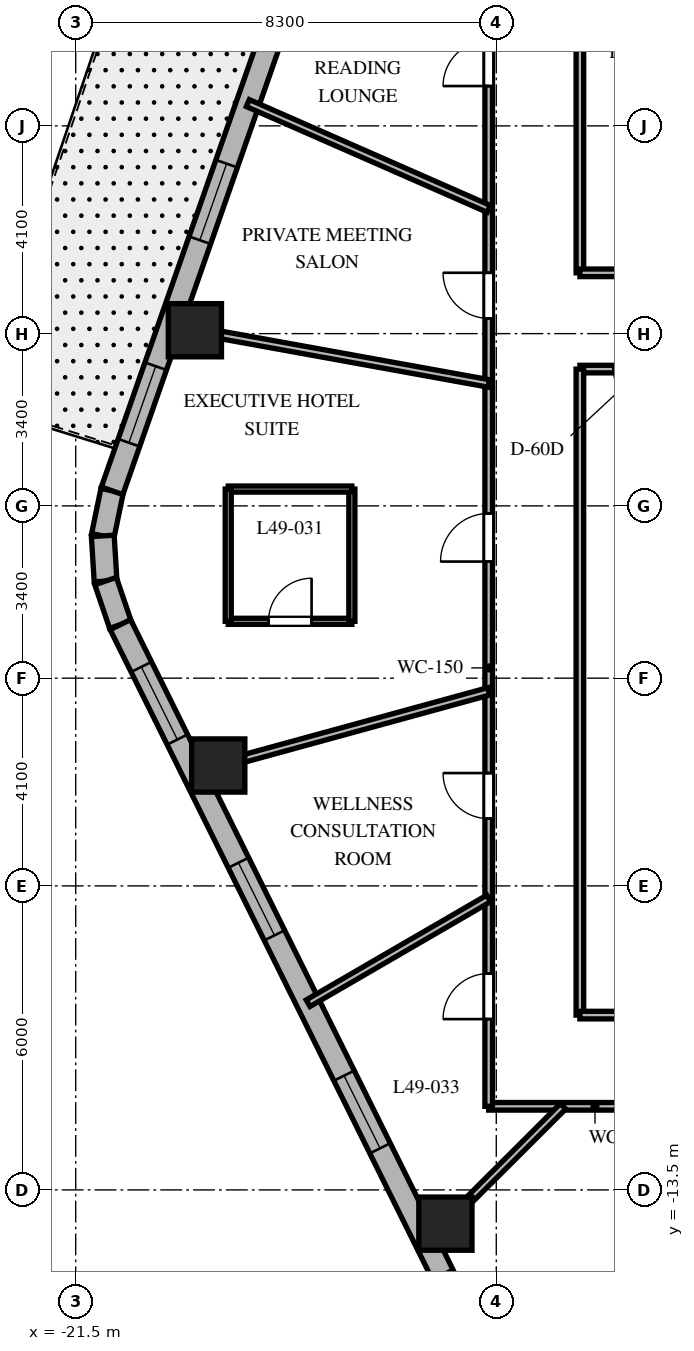
"""IFC4 building model, lengths in metres.
Left out: names, types, materials, properties, quantities, classifications, styles, units other than length and angle.
Written with IfcOpenShell. Run it as: python <this file> out.ifc"""

import sys

from ifc_helpers import new_model, si_unit, direction, frame, frame_2d, origin, origin_2d, place, context, subcontext, project, spatial, rectangle, extrude, element, fill, save


model = new_model("IFC4")
c1 = context("Model", 3, precision=1e-05, world=origin(), true_north=direction((0.0, 1.0)))
c2 = subcontext(c1, "Body", "Model", "MODEL_VIEW")
j1 = project(units=[si_unit("LENGTHUNIT", "METRE"), si_unit("PLANEANGLEUNIT", "RADIAN")], contexts=[c1])
p1 = place(None, origin())
s1 = spatial("IfcSite", under=j1, at=p1, CompositionType="ELEMENT")
p2 = place(p1, origin())
s2 = spatial("IfcBuilding", under=s1, at=p2, CompositionType="ELEMENT")
p3 = place(p2, frame((0.0, 0.0, 197.8)))
s3 = spatial("IfcBuildingStorey", under=s2, at=p3, CompositionType="ELEMENT", Elevation=197.8)
for number, where, z_axis, x_axis in (
    (1, (-19.148, 3.467, 0.0), (0.0, 0.0, 1.0), (1.0, 0.0, 0.0)),
    (2, (-18.687, -5.124, 0.0), (0.0, 0.0, 1.0), (1.0, 0.0, 0.0)),
    (3, (-14.204, -14.166, 0.0), (0.0, 0.0, 1.0), (1.0, 0.0, 0.0)),
):
    element("IfcColumn", number, at=place(p3, frame(where, z_axis=z_axis, x_axis=x_axis)), inside=s3, PredefinedType="COLUMN", context=c2, shape_type="SweptSolid", body=[
        extrude(rectangle(XDim=1.05, YDim=1.05, at=origin_2d()), origin(), (0.0, 0.0, 1.0), 3.7),
    ])
p4 = place(p3, frame((-20.782, 0.298, 0.0), z_axis=(0.0, 0.0, 1.0), x_axis=(-0.202570068411, -0.979267771033, 0.0)))
e4 = element("IfcWall", 4, at=p4, inside=s3, PredefinedType="SOLIDWALL", context=c2, shape_type="SweptSolid", body=[
    extrude(rectangle(XDim=0.909, YDim=0.45, at=frame_2d((0.454, 0.0))), origin(), (0.0, 0.0, 1.0), 3.35),
])
p5 = place(p3, frame((-20.966, -0.592, 0.0), z_axis=(0.0, 0.0, 1.0), x_axis=(0.061748898935, -0.998091715966, 0.0)))
e5 = element("IfcWall", 5, at=p5, inside=s3, PredefinedType="SOLIDWALL", context=c2, shape_type="SweptSolid", body=[
    extrude(rectangle(XDim=0.894, YDim=0.45, at=frame_2d((0.447, 0.0))), origin(), (0.0, 0.0, 1.0), 3.35),
])
p6 = place(p3, frame((-20.911, -1.484, 0.0), z_axis=(0.0, 0.0, 1.0), x_axis=(0.321623334353, -0.946867694453, 0.0)))
e6 = element("IfcWall", 6, at=p6, inside=s3, PredefinedType="SOLIDWALL", context=c2, shape_type="SweptSolid", body=[
    extrude(rectangle(XDim=0.909, YDim=0.45, at=frame_2d((0.454, 0.0))), origin(), (0.0, 0.0, 1.0), 3.35),
])
p7 = place(p3, frame((-14.937, 16.993, 0.0), z_axis=(0.0, 0.0, 1.0), x_axis=(-0.330431575061, -0.943829949834, 0.0)))
e7 = element("IfcWall", 7, at=p7, inside=s3, PredefinedType="SOLIDWALL", context=c2, shape_type="SweptSolid", body=[
    extrude(rectangle(XDim=17.689, YDim=0.45, at=frame_2d((8.844, 0.0))), origin(), (0.0, 0.0, 1.0), 3.35),
])
p8 = place(p7, frame((4.807, 0.0, 0.0)))
e8 = element("IfcOpeningElement", 8, at=p8, cuts=e7, PredefinedType="OPENING", context=c2, shape_type="SweptSolid", body=[
    extrude(rectangle(XDim=1.0, YDim=2.15, at=frame_2d((0.5, 1.075))), frame((0.0, 0.235, 0.0), z_axis=(0.0, -1.0, 0.0), x_axis=(1.0, 0.0, 0.0)), (0.0, 0.0, 1.0), 0.47),
])
p9 = place(p7, frame((0.95, 0.0, 0.8)))
e9 = element("IfcOpeningElement", 9, at=p9, cuts=e7, PredefinedType="OPENING", context=c2, shape_type="SweptSolid", body=[
    extrude(rectangle(XDim=1.6, YDim=1.75, at=frame_2d((0.8, 0.875))), frame((0.0, 0.235, 0.0), z_axis=(0.0, -1.0, 0.0), x_axis=(1.0, 0.0, 0.0)), (0.0, 0.0, 1.0), 0.47),
])
p10 = place(p7, frame((6.623, 0.0, 0.8)))
e10 = element("IfcOpeningElement", 10, at=p10, cuts=e7, PredefinedType="OPENING", context=c2, shape_type="SweptSolid", body=[
    extrude(rectangle(XDim=1.6, YDim=1.75, at=frame_2d((0.8, 0.875))), frame((0.0, 0.235, 0.0), z_axis=(0.0, -1.0, 0.0), x_axis=(1.0, 0.0, 0.0)), (0.0, 0.0, 1.0), 0.47),
])
p11 = place(p7, frame((10.849, 0.0, 0.8)))
e11 = element("IfcOpeningElement", 11, at=p11, cuts=e7, PredefinedType="OPENING", context=c2, shape_type="SweptSolid", body=[
    extrude(rectangle(XDim=1.6, YDim=1.75, at=frame_2d((0.8, 0.875))), frame((0.0, 0.235, 0.0), z_axis=(0.0, -1.0, 0.0), x_axis=(1.0, 0.0, 0.0)), (0.0, 0.0, 1.0), 0.47),
])
p12 = place(p7, frame((15.084, 0.0, 0.8)))
e12 = element("IfcOpeningElement", 12, at=p12, cuts=e7, PredefinedType="OPENING", context=c2, shape_type="SweptSolid", body=[
    extrude(rectangle(XDim=1.6, YDim=1.75, at=frame_2d((0.8, 0.875))), frame((0.0, 0.235, 0.0), z_axis=(0.0, -1.0, 0.0), x_axis=(1.0, 0.0, 0.0)), (0.0, 0.0, 1.0), 0.47),
])
p13 = place(p3, frame((-20.618, -2.344, 0.0), z_axis=(0.0, 0.0, 1.0), x_axis=(0.444243691097, -0.895905990002, 0.0)))
e13 = element("IfcWall", 13, at=p13, inside=s3, PredefinedType="SOLIDWALL", context=c2, shape_type="SweptSolid", body=[
    extrude(rectangle(XDim=16.784, YDim=0.45, at=frame_2d((8.392, 0.0))), origin(), (0.0, 0.0, 1.0), 3.35),
])
p14 = place(p13, frame((0.931, 0.0, 0.8)))
e14 = element("IfcOpeningElement", 14, at=p14, cuts=e13, PredefinedType="OPENING", context=c2, shape_type="SweptSolid", body=[
    extrude(rectangle(XDim=1.6, YDim=1.75, at=frame_2d((0.8, 0.875))), frame((0.0, 0.235, 0.0), z_axis=(0.0, -1.0, 0.0), x_axis=(1.0, 0.0, 0.0)), (0.0, 0.0, 1.0), 0.47),
])
p15 = place(p13, frame((5.245, 0.0, 0.8)))
e15 = element("IfcOpeningElement", 15, at=p15, cuts=e13, PredefinedType="OPENING", context=c2, shape_type="SweptSolid", body=[
    extrude(rectangle(XDim=1.6, YDim=1.75, at=frame_2d((0.8, 0.875))), frame((0.0, 0.235, 0.0), z_axis=(0.0, -1.0, 0.0), x_axis=(1.0, 0.0, 0.0)), (0.0, 0.0, 1.0), 0.47),
])
p16 = place(p13, frame((9.936, 0.0, 0.8)))
e16 = element("IfcOpeningElement", 16, at=p16, cuts=e13, PredefinedType="OPENING", context=c2, shape_type="SweptSolid", body=[
    extrude(rectangle(XDim=1.6, YDim=1.75, at=frame_2d((0.8, 0.875))), frame((0.0, 0.235, 0.0), z_axis=(0.0, -1.0, 0.0), x_axis=(1.0, 0.0, 0.0)), (0.0, 0.0, 1.0), 0.47),
])
p17 = place(p13, frame((14.303, 0.0, 0.8)))
e17 = element("IfcOpeningElement", 17, at=p17, cuts=e13, PredefinedType="OPENING", context=c2, shape_type="SweptSolid", body=[
    extrude(rectangle(XDim=1.6, YDim=1.75, at=frame_2d((0.8, 0.875))), frame((0.0, 0.235, 0.0), z_axis=(0.0, -1.0, 0.0), x_axis=(1.0, 0.0, 0.0)), (0.0, 0.0, 1.0), 0.47),
])
p18 = place(p3, frame((13.35, -11.85, 0.0), z_axis=(0.0, 0.0, 1.0), x_axis=(-1.0, 0.0, 0.0)))
e18 = element("IfcWall", 18, at=p18, inside=s3, PredefinedType="PARTITIONING", context=c2, shape_type="SweptSolid", body=[
    extrude(rectangle(XDim=26.7, YDim=0.15, at=frame_2d((13.35, 0.0))), origin(), (0.0, 0.0, 1.0), 2.14),
])
p19 = place(p18, frame((20.682, 0.0, 0.0)))
e19 = element("IfcOpeningElement", 19, at=p19, cuts=e18, PredefinedType="OPENING", context=c2, shape_type="SweptSolid", body=[
    extrude(rectangle(XDim=0.95, YDim=2.03, at=frame_2d((0.475, 1.015))), frame((0.0, 0.085, 0.0), z_axis=(0.0, -1.0, 0.0), x_axis=(1.0, 0.0, 0.0)), (0.0, 0.0, 1.0), 0.17),
])
p20 = place(p18, frame((14.708, 0.0, 0.0)))
e20 = element("IfcOpeningElement", 20, at=p20, cuts=e18, PredefinedType="OPENING", context=c2, shape_type="SweptSolid", body=[
    extrude(rectangle(XDim=0.95, YDim=2.03, at=frame_2d((0.475, 1.015))), frame((0.0, 0.085, 0.0), z_axis=(0.0, -1.0, 0.0), x_axis=(1.0, 0.0, 0.0)), (0.0, 0.0, 1.0), 0.17),
])
p21 = place(p18, frame((10.553, 0.0, 0.0)))
e21 = element("IfcOpeningElement", 21, at=p21, cuts=e18, PredefinedType="OPENING", context=c2, shape_type="SweptSolid", body=[
    extrude(rectangle(XDim=0.95, YDim=2.03, at=frame_2d((0.475, 1.015))), frame((0.0, 0.085, 0.0), z_axis=(0.0, -1.0, 0.0), x_axis=(1.0, 0.0, 0.0)), (0.0, 0.0, 1.0), 0.17),
])
p22 = place(p18, frame((3.97, 0.0, 0.0)))
e22 = element("IfcOpeningElement", 22, at=p22, cuts=e18, PredefinedType="OPENING", context=c2, shape_type="SweptSolid", body=[
    extrude(rectangle(XDim=1.0, YDim=2.03, at=frame_2d((0.5, 1.015))), frame((0.0, 0.085, 0.0), z_axis=(0.0, -1.0, 0.0), x_axis=(1.0, 0.0, 0.0)), (0.0, 0.0, 1.0), 0.17),
])
p23 = place(p3, frame((-13.35, -11.85, 0.0), z_axis=(0.0, 0.0, 1.0), x_axis=(0.0, 1.0, 0.0)))
e23 = element("IfcWall", 23, at=p23, inside=s3, PredefinedType="PARTITIONING", context=c2, shape_type="SweptSolid", body=[
    extrude(rectangle(XDim=23.7, YDim=0.15, at=frame_2d((11.85, 0.0))), origin(), (0.0, 0.0, 1.0), 2.79),
])
p24 = place(p23, frame((20.136, 0.0, 0.0)))
e24 = element("IfcOpeningElement", 24, at=p24, cuts=e23, PredefinedType="OPENING", context=c2, shape_type="SweptSolid", body=[
    extrude(rectangle(XDim=0.9, YDim=2.03, at=frame_2d((0.45, 1.015))), frame((0.0, 0.085, 0.0), z_axis=(0.0, -1.0, 0.0), x_axis=(1.0, 0.0, 0.0)), (0.0, 0.0, 1.0), 0.17),
])
p25 = place(p23, frame((15.551, 0.0, 0.0)))
e25 = element("IfcOpeningElement", 25, at=p25, cuts=e23, PredefinedType="OPENING", context=c2, shape_type="SweptSolid", body=[
    extrude(rectangle(XDim=0.9, YDim=2.03, at=frame_2d((0.45, 1.015))), frame((0.0, 0.085, 0.0), z_axis=(0.0, -1.0, 0.0), x_axis=(1.0, 0.0, 0.0)), (0.0, 0.0, 1.0), 0.17),
])
p26 = place(p23, frame((10.751, 0.0, 0.0)))
e26 = element("IfcOpeningElement", 26, at=p26, cuts=e23, PredefinedType="OPENING", context=c2, shape_type="SweptSolid", body=[
    extrude(rectangle(XDim=0.95, YDim=2.03, at=frame_2d((0.475, 1.015))), frame((0.0, 0.085, 0.0), z_axis=(0.0, -1.0, 0.0), x_axis=(1.0, 0.0, 0.0)), (0.0, 0.0, 1.0), 0.17),
])
p27 = place(p23, frame((5.677, 0.0, 0.0)))
e27 = element("IfcOpeningElement", 27, at=p27, cuts=e23, PredefinedType="OPENING", context=c2, shape_type="SweptSolid", body=[
    extrude(rectangle(XDim=0.9, YDim=2.03, at=frame_2d((0.45, 1.015))), frame((0.0, 0.085, 0.0), z_axis=(0.0, -1.0, 0.0), x_axis=(1.0, 0.0, 0.0)), (0.0, 0.0, 1.0), 0.17),
])
p28 = place(p23, frame((1.721, 0.0, 0.0)))
e28 = element("IfcOpeningElement", 28, at=p28, cuts=e23, PredefinedType="OPENING", context=c2, shape_type="SweptSolid", body=[
    extrude(rectangle(XDim=0.9, YDim=2.03, at=frame_2d((0.45, 1.015))), frame((0.0, 0.085, 0.0), z_axis=(0.0, -1.0, 0.0), x_axis=(1.0, 0.0, 0.0)), (0.0, 0.0, 1.0), 0.17),
])
p29 = place(p3, frame((-11.55, 10.05, 0.0), z_axis=(0.0, 0.0, 1.0), x_axis=(0.0, -1.0, 0.0)))
e29 = element("IfcWall", 29, at=p29, inside=s3, PredefinedType="PARTITIONING", context=c2, shape_type="SweptSolid", body=[
    extrude(rectangle(XDim=5.45, YDim=0.15, at=frame_2d((2.725, 0.0))), origin(), (0.0, 0.0, 1.0), 2.79),
])
p30 = place(p3, frame((-11.55, 4.6, 0.0), z_axis=(0.0, 0.0, 1.0), x_axis=(1.0, 0.0, 0.0)))
e30 = element("IfcWall", 30, at=p30, inside=s3, PredefinedType="PARTITIONING", context=c2, shape_type="SweptSolid", body=[
    extrude(rectangle(XDim=2.175, YDim=0.15, at=frame_2d((1.087, 0.0))), origin(), (0.0, 0.0, 1.0), 3.35),
])
p31 = place(p3, frame((-9.375, 2.7, 0.0), z_axis=(0.0, 0.0, 1.0), x_axis=(-1.0, 0.0, 0.0)))
e31 = element("IfcWall", 31, at=p31, inside=s3, PredefinedType="PARTITIONING", context=c2, shape_type="SweptSolid", body=[
    extrude(rectangle(XDim=2.175, YDim=0.15, at=frame_2d((1.087, 0.0))), origin(), (0.0, 0.0, 1.0), 3.35),
])
p32 = place(p31, frame((0.663, 0.0, 0.0)))
e32 = element("IfcOpeningElement", 32, at=p32, cuts=e31, PredefinedType="OPENING", context=c2, shape_type="SweptSolid", body=[
    extrude(rectangle(XDim=0.85, YDim=2.03, at=frame_2d((0.425, 1.015))), frame((0.0, 0.085, 0.0), z_axis=(0.0, -1.0, 0.0), x_axis=(1.0, 0.0, 0.0)), (0.0, 0.0, 1.0), 0.17),
])
p33 = place(p3, frame((-11.55, 2.7, 0.0), z_axis=(0.0, 0.0, 1.0), x_axis=(0.0, -1.0, 0.0)))
e33 = element("IfcWall", 33, at=p33, inside=s3, PredefinedType="PARTITIONING", context=c2, shape_type="SweptSolid", body=[
    extrude(rectangle(XDim=12.75, YDim=0.15, at=frame_2d((6.375, 0.0))), origin(), (0.0, 0.0, 1.0), 2.79),
])
p34 = place(p3, frame((-11.55, -10.05, 0.0), z_axis=(0.0, 0.0, 1.0), x_axis=(1.0, 0.0, 0.0)))
e34 = element("IfcWall", 34, at=p34, inside=s3, PredefinedType="PARTITIONING", context=c2, shape_type="SweptSolid", body=[
    extrude(rectangle(XDim=11.55, YDim=0.15, at=frame_2d((5.775, 0.0))), origin(), (0.0, 0.0, 1.0), 2.14),
])
p35 = place(p3, frame((-13.35, 5.863, 0.0), z_axis=(0.0, 0.0, 1.0), x_axis=(-0.9155832175, 0.402128551376, 0.0)))
e35 = element("IfcWall", 35, at=p35, inside=s3, PredefinedType="PARTITIONING", context=c2, shape_type="SweptSolid", body=[
    extrude(rectangle(XDim=5.191, YDim=0.15, at=frame_2d((2.595, 0.0))), origin(), (0.0, 0.0, 1.0), 2.59),
])
p36 = place(p3, frame((-13.35, 2.417, 0.0), z_axis=(0.0, 0.0, 1.0), x_axis=(-0.98399796473, 0.178179699761, 0.0)))
e36 = element("IfcWall", 36, at=p36, inside=s3, PredefinedType="PARTITIONING", context=c2, shape_type="SweptSolid", body=[
    extrude(rectangle(XDim=6.393, YDim=0.15, at=frame_2d((3.197, 0.0))), origin(), (0.0, 0.0, 1.0), 2.59),
])
p37 = place(p3, frame((-13.35, -3.661, 0.0), z_axis=(0.0, 0.0, 1.0), x_axis=(-0.964397145454, -0.264458211898, 0.0)))
e37 = element("IfcWall", 37, at=p37, inside=s3, PredefinedType="PARTITIONING", context=c2, shape_type="SweptSolid", body=[
    extrude(rectangle(XDim=6.039, YDim=0.15, at=frame_2d((3.019, 0.0))), origin(), (0.0, 0.0, 1.0), 2.59),
])
p38 = place(p3, frame((-13.35, -7.748, 0.0), z_axis=(0.0, 0.0, 1.0), x_axis=(-0.864894342526, -0.501953958313, 0.0)))
e38 = element("IfcWall", 38, at=p38, inside=s3, PredefinedType="PARTITIONING", context=c2, shape_type="SweptSolid", body=[
    extrude(rectangle(XDim=4.12, YDim=0.15, at=frame_2d((2.06, 0.0))), origin(), (0.0, 0.0, 1.0), 2.59),
])
p39 = place(p3, frame((-11.882, -11.85, 0.0), z_axis=(0.0, 0.0, 1.0), x_axis=(-0.708037373639, -0.706174962407, 0.0)))
e39 = element("IfcWall", 39, at=p39, inside=s3, PredefinedType="PARTITIONING", context=c2, shape_type="SweptSolid", body=[
    extrude(rectangle(XDim=3.802, YDim=0.15, at=frame_2d((1.901, 0.0))), origin(), (0.0, 0.0, 1.0), 2.59),
])
p40 = place(p3, frame((-18.49, -2.278, 0.0), z_axis=(0.0, 0.0, 1.0), x_axis=(1.0, 0.0, 0.0)))
e40 = element("IfcWall", 40, at=p40, inside=s3, PredefinedType="PARTITIONING", context=c2, shape_type="SweptSolid", body=[
    extrude(rectangle(XDim=2.44, YDim=0.12, at=frame_2d((1.22, 0.0))), origin(), (0.0, 0.0, 1.0), 3.35),
])
p41 = place(p40, frame((0.795, 0.0, 0.0)))
e41 = element("IfcOpeningElement", 41, at=p41, cuts=e40, PredefinedType="OPENING", context=c2, shape_type="SweptSolid", body=[
    extrude(rectangle(XDim=0.85, YDim=2.03, at=frame_2d((0.425, 1.015))), frame((0.0, 0.07, 0.0), z_axis=(0.0, -1.0, 0.0), x_axis=(1.0, 0.0, 0.0)), (0.0, 0.0, 1.0), 0.14),
])
p42 = place(p3, frame((-16.05, -2.278, 0.0), z_axis=(0.0, 0.0, 1.0), x_axis=(0.0, 1.0, 0.0)))
e42 = element("IfcWall", 42, at=p42, inside=s3, PredefinedType="PARTITIONING", context=c2, shape_type="SweptSolid", body=[
    extrude(rectangle(XDim=2.61, YDim=0.12, at=frame_2d((1.305, 0.0))), origin(), (0.0, 0.0, 1.0), 3.35),
])
p43 = place(p3, frame((-16.05, 0.332, 0.0), z_axis=(0.0, 0.0, 1.0), x_axis=(-1.0, 0.0, 0.0)))
e43 = element("IfcWall", 43, at=p43, inside=s3, PredefinedType="PARTITIONING", context=c2, shape_type="SweptSolid", body=[
    extrude(rectangle(XDim=2.44, YDim=0.12, at=frame_2d((1.22, 0.0))), origin(), (0.0, 0.0, 1.0), 3.35),
])
p44 = place(p3, frame((-18.49, 0.332, 0.0), z_axis=(0.0, 0.0, 1.0), x_axis=(0.0, -1.0, 0.0)))
e44 = element("IfcWall", 44, at=p44, inside=s3, PredefinedType="PARTITIONING", context=c2, shape_type="SweptSolid", body=[
    extrude(rectangle(XDim=2.61, YDim=0.12, at=frame_2d((1.305, 0.0))), origin(), (0.0, 0.0, 1.0), 3.35),
])
p45 = place(p11, origin())
e45 = element("IfcWindow", 45, at=p45, inside=s3, PartitioningType="SINGLE_PANEL", PredefinedType="WINDOW", context=c2, shape_type="SweptSolid", body=[
    extrude(rectangle(XDim=1.6, YDim=1.75, at=frame_2d((0.8, 0.875))), frame((0.0, 0.03, 0.0), z_axis=(0.0, -1.0, 0.0), x_axis=(1.0, 0.0, 0.0)), (0.0, 0.0, 1.0), 0.06),
])
fill(e11, e45)
p46 = place(p12, origin())
e46 = element("IfcWindow", 46, at=p46, inside=s3, PartitioningType="SINGLE_PANEL", PredefinedType="WINDOW", context=c2, shape_type="SweptSolid", body=[
    extrude(rectangle(XDim=1.6, YDim=1.75, at=frame_2d((0.8, 0.875))), frame((0.0, 0.03, 0.0), z_axis=(0.0, -1.0, 0.0), x_axis=(1.0, 0.0, 0.0)), (0.0, 0.0, 1.0), 0.06),
])
fill(e12, e46)
p47 = place(p14, origin())
e47 = element("IfcWindow", 47, at=p47, inside=s3, PartitioningType="SINGLE_PANEL", PredefinedType="WINDOW", context=c2, shape_type="SweptSolid", body=[
    extrude(rectangle(XDim=1.6, YDim=1.75, at=frame_2d((0.8, 0.875))), frame((0.0, 0.03, 0.0), z_axis=(0.0, -1.0, 0.0), x_axis=(1.0, 0.0, 0.0)), (0.0, 0.0, 1.0), 0.06),
])
fill(e14, e47)
p48 = place(p15, origin())
e48 = element("IfcWindow", 48, at=p48, inside=s3, PartitioningType="SINGLE_PANEL", PredefinedType="WINDOW", context=c2, shape_type="SweptSolid", body=[
    extrude(rectangle(XDim=1.6, YDim=1.75, at=frame_2d((0.8, 0.875))), frame((0.0, 0.03, 0.0), z_axis=(0.0, -1.0, 0.0), x_axis=(1.0, 0.0, 0.0)), (0.0, 0.0, 1.0), 0.06),
])
fill(e15, e48)
p49 = place(p16, origin())
e49 = element("IfcWindow", 49, at=p49, inside=s3, PartitioningType="SINGLE_PANEL", PredefinedType="WINDOW", context=c2, shape_type="SweptSolid", body=[
    extrude(rectangle(XDim=1.6, YDim=1.75, at=frame_2d((0.8, 0.875))), frame((0.0, 0.03, 0.0), z_axis=(0.0, -1.0, 0.0), x_axis=(1.0, 0.0, 0.0)), (0.0, 0.0, 1.0), 0.06),
])
fill(e16, e49)
p50 = place(p32, origin())
e50 = element("IfcDoor", 50, at=p50, inside=s3, OperationType="SINGLE_SWING_LEFT", PredefinedType="DOOR", context=c2, shape_type="SweptSolid", body=[
    extrude(rectangle(XDim=0.85, YDim=2.03, at=frame_2d((0.425, 1.015))), frame((0.0, 0.025, 0.0), z_axis=(0.0, -1.0, 0.0), x_axis=(1.0, 0.0, 0.0)), (0.0, 0.0, 1.0), 0.05),
])
fill(e32, e50)
p51 = place(p24, origin())
e51 = element("IfcDoor", 51, at=p51, inside=s3, OperationType="SINGLE_SWING_LEFT", PredefinedType="DOOR", context=c2, shape_type="SweptSolid", body=[
    extrude(rectangle(XDim=0.9, YDim=2.03, at=frame_2d((0.45, 1.015))), frame((0.0, 0.025, 0.0), z_axis=(0.0, -1.0, 0.0), x_axis=(1.0, 0.0, 0.0)), (0.0, 0.0, 1.0), 0.05),
])
fill(e24, e51)
p52 = place(p25, origin())
e52 = element("IfcDoor", 52, at=p52, inside=s3, OperationType="SINGLE_SWING_RIGHT", PredefinedType="DOOR", context=c2, shape_type="SweptSolid", body=[
    extrude(rectangle(XDim=0.9, YDim=2.03, at=frame_2d((0.45, 1.015))), frame((0.0, 0.025, 0.0), z_axis=(0.0, -1.0, 0.0), x_axis=(1.0, 0.0, 0.0)), (0.0, 0.0, 1.0), 0.05),
])
fill(e25, e52)
p53 = place(p26, origin())
e53 = element("IfcDoor", 53, at=p53, inside=s3, OperationType="SINGLE_SWING_LEFT", PredefinedType="DOOR", context=c2, shape_type="SweptSolid", body=[
    extrude(rectangle(XDim=0.95, YDim=2.03, at=frame_2d((0.475, 1.015))), frame((0.0, 0.025, 0.0), z_axis=(0.0, -1.0, 0.0), x_axis=(1.0, 0.0, 0.0)), (0.0, 0.0, 1.0), 0.05),
])
fill(e26, e53)
p54 = place(p41, origin())
e54 = element("IfcDoor", 54, at=p54, inside=s3, OperationType="SINGLE_SWING_RIGHT", PredefinedType="DOOR", context=c2, shape_type="SweptSolid", body=[
    extrude(rectangle(XDim=0.85, YDim=2.03, at=frame_2d((0.425, 1.015))), frame((0.0, 0.025, 0.0), z_axis=(0.0, -1.0, 0.0), x_axis=(1.0, 0.0, 0.0)), (0.0, 0.0, 1.0), 0.05),
])
fill(e41, e54)
p55 = place(p27, origin())
e55 = element("IfcDoor", 55, at=p55, inside=s3, OperationType="SINGLE_SWING_RIGHT", PredefinedType="DOOR", context=c2, shape_type="SweptSolid", body=[
    extrude(rectangle(XDim=0.9, YDim=2.03, at=frame_2d((0.45, 1.015))), frame((0.0, 0.025, 0.0), z_axis=(0.0, -1.0, 0.0), x_axis=(1.0, 0.0, 0.0)), (0.0, 0.0, 1.0), 0.05),
])
fill(e27, e55)
p56 = place(p28, origin())
e56 = element("IfcDoor", 56, at=p56, inside=s3, OperationType="SINGLE_SWING_LEFT", PredefinedType="DOOR", context=c2, shape_type="SweptSolid", body=[
    extrude(rectangle(XDim=0.9, YDim=2.03, at=frame_2d((0.45, 1.015))), frame((0.0, 0.025, 0.0), z_axis=(0.0, -1.0, 0.0), x_axis=(1.0, 0.0, 0.0)), (0.0, 0.0, 1.0), 0.05),
])
fill(e28, e56)
save(model, sys.argv[1])
